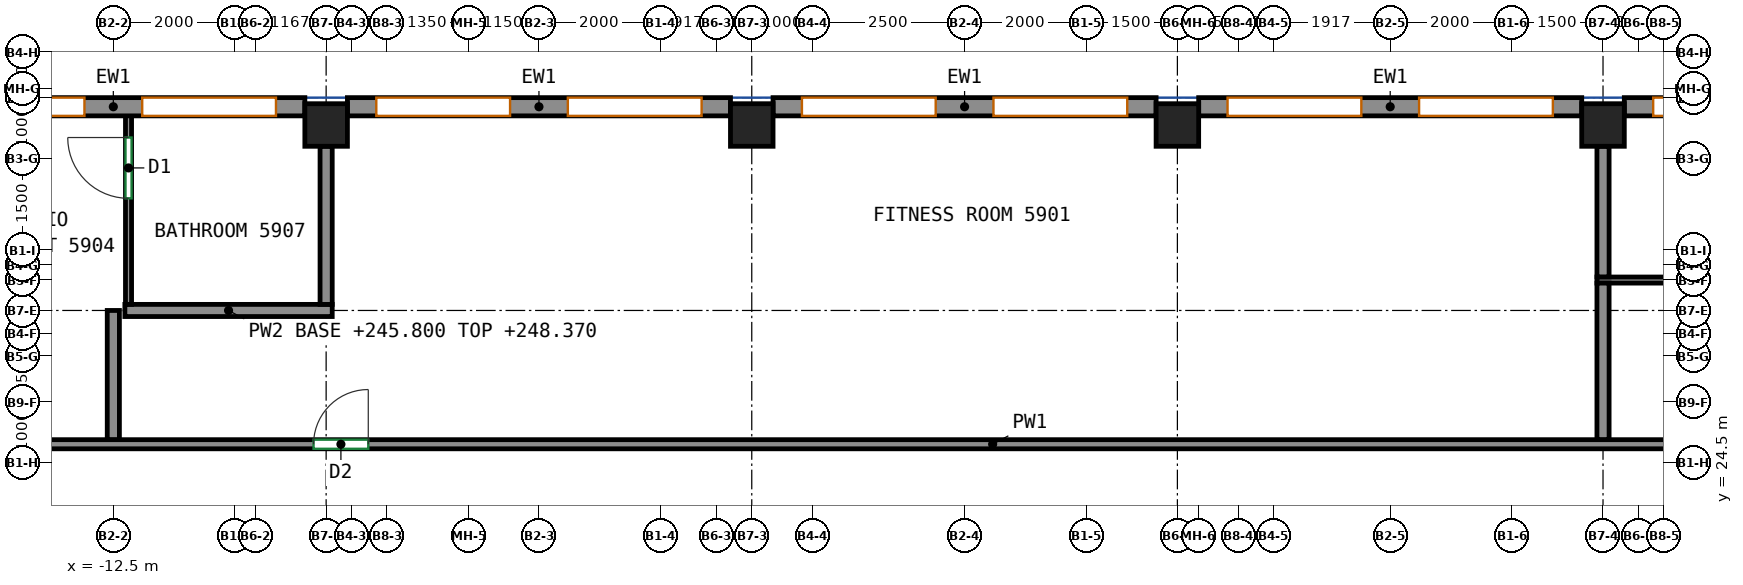
"""IFC4 building model, lengths in metres.
Left out: names, types, materials, properties, quantities, classifications, styles, units other than length and angle.
Written with IfcOpenShell. Run it as: python <this file> out.ifc"""

import sys

from ifc_helpers import new_model, si_unit, direction, frame, frame_2d, origin, origin_2d, place, context, subcontext, project, spatial, rectangle, extrude, source, transform, mapped, element, fill, save


model = new_model("IFC4")
c1 = context("Model", 3, precision=1e-05, world=origin(), true_north=direction((0.0, 1.0)))
c2 = subcontext(c1, "Body", "Model", "MODEL_VIEW")
j1 = project(units=[si_unit("LENGTHUNIT", "METRE"), si_unit("PLANEANGLEUNIT", "RADIAN")], contexts=[c1])
p1 = place(None, origin())
s1 = spatial("IfcSite", under=j1, at=p1, CompositionType="ELEMENT")
p2 = place(p1, origin())
s2 = spatial("IfcBuilding", under=s1, at=p2, CompositionType="ELEMENT")
p3 = place(p2, frame((0.0, 0.0, 245.8)))
s3 = spatial("IfcBuildingStorey", under=s2, at=p3, CompositionType="ELEMENT", Elevation=245.8)
m1 = source(origin(), c2, "Body", "SweptSolid", [
    extrude(rectangle(XDim=0.7, YDim=0.7, at=origin_2d()), origin(), (0.0, 0.0, 1.0), 3.12),
])
for number, where, z_axis, x_axis in (
    (1, (-9.0, 30.05, 0.0), (0.0, 0.0, 1.0), (1.0, 0.0, 0.0)),
    (2, (-2.0, 30.05, 0.0), (0.0, 0.0, 1.0), (1.0, 0.0, 0.0)),
    (3, (5.0, 30.05, 0.0), (0.0, 0.0, 1.0), (1.0, 0.0, 0.0)),
    (4, (12.0, 30.05, 0.0), (0.0, 0.0, 1.0), (1.0, 0.0, 0.0)),
):
    element("IfcColumn", number, at=place(p3, frame(where, z_axis=z_axis, x_axis=x_axis)), inside=s3, PredefinedType="COLUMN", context=c2, shape_type="MappedRepresentation", body=[
        mapped(m1, transform((0.0, 0.0, 0.0))),
    ])
m2 = source(origin(), c2, "Body", "SweptSolid", [
    extrude(rectangle(XDim=6.3, YDim=0.3, at=frame_2d((3.15, 0.0))), origin(), (0.0, 0.0, 1.0), 3.12),
])
p4 = place(p3, frame((18.65, 30.35, 0.0), z_axis=(0.0, 0.0, 1.0), x_axis=(-1.0, 0.0, 0.0)))
e5 = element("IfcWall", 5, at=p4, inside=s3, PredefinedType="SOLIDWALL", context=c2, shape_type="MappedRepresentation", body=[
    mapped(m2, transform((0.0, 0.0, 0.0))),
])
p5 = place(p4, frame((0.475, 0.0, 0.8)))
e6 = element("IfcOpeningElement", 6, at=p5, cuts=e5, PredefinedType="OPENING", context=c2, shape_type="SweptSolid", body=[
    extrude(rectangle(XDim=2.2, YDim=2.05, at=frame_2d((1.1, 1.025))), frame((0.0, 0.16, 0.0), z_axis=(0.0, -1.0, 0.0), x_axis=(1.0, 0.0, 0.0)), (0.0, 0.0, 1.0), 0.32),
])
p6 = place(p4, frame((3.625, 0.0, 0.8)))
e7 = element("IfcOpeningElement", 7, at=p6, cuts=e5, PredefinedType="OPENING", context=c2, shape_type="SweptSolid", body=[
    extrude(rectangle(XDim=2.2, YDim=2.05, at=frame_2d((1.1, 1.025))), frame((0.0, 0.16, 0.0), z_axis=(0.0, -1.0, 0.0), x_axis=(1.0, 0.0, 0.0)), (0.0, 0.0, 1.0), 0.32),
])
p7 = place(p3, frame((11.65, 30.35, 0.0), z_axis=(0.0, 0.0, 1.0), x_axis=(-1.0, 0.0, 0.0)))
e8 = element("IfcWall", 8, at=p7, inside=s3, PredefinedType="SOLIDWALL", context=c2, shape_type="MappedRepresentation", body=[
    mapped(m2, transform((0.0, 0.0, 0.0))),
])
p8 = place(p7, frame((0.475, 0.0, 0.8)))
e9 = element("IfcOpeningElement", 9, at=p8, cuts=e8, PredefinedType="OPENING", context=c2, shape_type="SweptSolid", body=[
    extrude(rectangle(XDim=2.2, YDim=2.05, at=frame_2d((1.1, 1.025))), frame((0.0, 0.16, 0.0), z_axis=(0.0, -1.0, 0.0), x_axis=(1.0, 0.0, 0.0)), (0.0, 0.0, 1.0), 0.32),
])
p9 = place(p7, frame((3.625, 0.0, 0.8)))
e10 = element("IfcOpeningElement", 10, at=p9, cuts=e8, PredefinedType="OPENING", context=c2, shape_type="SweptSolid", body=[
    extrude(rectangle(XDim=2.2, YDim=2.05, at=frame_2d((1.1, 1.025))), frame((0.0, 0.16, 0.0), z_axis=(0.0, -1.0, 0.0), x_axis=(1.0, 0.0, 0.0)), (0.0, 0.0, 1.0), 0.32),
])
p10 = place(p3, frame((4.65, 30.35, 0.0), z_axis=(0.0, 0.0, 1.0), x_axis=(-1.0, 0.0, 0.0)))
e11 = element("IfcWall", 11, at=p10, inside=s3, PredefinedType="SOLIDWALL", context=c2, shape_type="MappedRepresentation", body=[
    mapped(m2, transform((0.0, 0.0, 0.0))),
])
p11 = place(p10, frame((0.475, 0.0, 0.8)))
e12 = element("IfcOpeningElement", 12, at=p11, cuts=e11, PredefinedType="OPENING", context=c2, shape_type="SweptSolid", body=[
    extrude(rectangle(XDim=2.2, YDim=2.05, at=frame_2d((1.1, 1.025))), frame((0.0, 0.16, 0.0), z_axis=(0.0, -1.0, 0.0), x_axis=(1.0, 0.0, 0.0)), (0.0, 0.0, 1.0), 0.32),
])
p12 = place(p10, frame((3.625, 0.0, 0.8)))
e13 = element("IfcOpeningElement", 13, at=p12, cuts=e11, PredefinedType="OPENING", context=c2, shape_type="SweptSolid", body=[
    extrude(rectangle(XDim=2.2, YDim=2.05, at=frame_2d((1.1, 1.025))), frame((0.0, 0.16, 0.0), z_axis=(0.0, -1.0, 0.0), x_axis=(1.0, 0.0, 0.0)), (0.0, 0.0, 1.0), 0.32),
])
p13 = place(p3, frame((-2.35, 30.35, 0.0), z_axis=(0.0, 0.0, 1.0), x_axis=(-1.0, 0.0, 0.0)))
e14 = element("IfcWall", 14, at=p13, inside=s3, PredefinedType="SOLIDWALL", context=c2, shape_type="MappedRepresentation", body=[
    mapped(m2, transform((0.0, 0.0, 0.0))),
])
p14 = place(p13, frame((0.475, 0.0, 0.8)))
e15 = element("IfcOpeningElement", 15, at=p14, cuts=e14, PredefinedType="OPENING", context=c2, shape_type="SweptSolid", body=[
    extrude(rectangle(XDim=2.2, YDim=2.05, at=frame_2d((1.1, 1.025))), frame((0.0, 0.16, 0.0), z_axis=(0.0, -1.0, 0.0), x_axis=(1.0, 0.0, 0.0)), (0.0, 0.0, 1.0), 0.32),
])
p15 = place(p13, frame((3.625, 0.0, 0.8)))
e16 = element("IfcOpeningElement", 16, at=p15, cuts=e14, PredefinedType="OPENING", context=c2, shape_type="SweptSolid", body=[
    extrude(rectangle(XDim=2.2, YDim=2.05, at=frame_2d((1.1, 1.025))), frame((0.0, 0.16, 0.0), z_axis=(0.0, -1.0, 0.0), x_axis=(1.0, 0.0, 0.0)), (0.0, 0.0, 1.0), 0.32),
])
p16 = place(p3, frame((-9.35, 30.35, 0.0), z_axis=(0.0, 0.0, 1.0), x_axis=(-1.0, 0.0, 0.0)))
e17 = element("IfcWall", 17, at=p16, inside=s3, PredefinedType="SOLIDWALL", context=c2, shape_type="MappedRepresentation", body=[
    mapped(m2, transform((0.0, 0.0, 0.0))),
])
p17 = place(p16, frame((0.475, 0.0, 0.8)))
e18 = element("IfcOpeningElement", 18, at=p17, cuts=e17, PredefinedType="OPENING", context=c2, shape_type="SweptSolid", body=[
    extrude(rectangle(XDim=2.2, YDim=2.05, at=frame_2d((1.1, 1.025))), frame((0.0, 0.16, 0.0), z_axis=(0.0, -1.0, 0.0), x_axis=(1.0, 0.0, 0.0)), (0.0, 0.0, 1.0), 0.32),
])
p18 = place(p16, frame((3.625, 0.0, 0.8)))
e19 = element("IfcOpeningElement", 19, at=p18, cuts=e17, PredefinedType="OPENING", context=c2, shape_type="SweptSolid", body=[
    extrude(rectangle(XDim=2.2, YDim=2.05, at=frame_2d((1.1, 1.025))), frame((0.0, 0.16, 0.0), z_axis=(0.0, -1.0, 0.0), x_axis=(1.0, 0.0, 0.0)), (0.0, 0.0, 1.0), 0.32),
])
p19 = place(p3, frame((-16.075, 24.8, 0.0), z_axis=(0.0, 0.0, 1.0), x_axis=(1.0, 0.0, 0.0)))
e20 = element("IfcWall", 20, at=p19, inside=s3, PredefinedType="PARTITIONING", context=c2, shape_type="SweptSolid", body=[
    extrude(rectangle(XDim=36.073, YDim=0.15, at=frame_2d((18.037, 0.0))), origin(), (0.0, 0.0, 1.0), 3.12),
])
p20 = place(p19, frame((6.868, 0.0, 0.0)))
e21 = element("IfcOpeningElement", 21, at=p20, cuts=e20, PredefinedType="OPENING", context=c2, shape_type="SweptSolid", body=[
    extrude(rectangle(XDim=0.9, YDim=2.1, at=frame_2d((0.45, 1.05))), frame((0.0, 0.085, 0.0), z_axis=(0.0, -1.0, 0.0), x_axis=(1.0, 0.0, 0.0)), (0.0, 0.0, 1.0), 0.17),
])
p21 = place(p19, frame((31.009, 0.0, 0.0)))
e22 = element("IfcOpeningElement", 22, at=p21, cuts=e20, PredefinedType="OPENING", context=c2, shape_type="SweptSolid", body=[
    extrude(rectangle(XDim=1.0, YDim=2.1, at=frame_2d((0.5, 1.05))), frame((0.0, 0.085, 0.0), z_axis=(0.0, -1.0, 0.0), x_axis=(1.0, 0.0, 0.0)), (0.0, 0.0, 1.0), 0.17),
])
p22 = place(p3, frame((11.9, 27.5, 0.0), z_axis=(0.0, 0.0, 1.0), x_axis=(1.0, 0.0, 0.0)))
e23 = element("IfcWall", 23, at=p22, inside=s3, PredefinedType="PARTITIONING", context=c2, shape_type="SweptSolid", body=[
    extrude(rectangle(XDim=10.66, YDim=0.1, at=frame_2d((5.33, 0.0))), origin(), (0.0, 0.0, 1.0), 3.12),
])
p23 = place(p22, frame((2.728, 0.0, 0.0)))
e24 = element("IfcOpeningElement", 24, at=p23, cuts=e23, PredefinedType="OPENING", context=c2, shape_type="SweptSolid", body=[
    extrude(rectangle(XDim=1.0, YDim=2.1, at=frame_2d((0.5, 1.05))), frame((0.0, 0.06, 0.0), z_axis=(0.0, -1.0, 0.0), x_axis=(1.0, 0.0, 0.0)), (0.0, 0.0, 1.0), 0.12),
])
p24 = place(p3, frame((12.0, 24.877, 0.0), z_axis=(0.0, 0.0, 1.0), x_axis=(0.0, 1.0, 0.0)))
e25 = element("IfcWall", 25, at=p24, inside=s3, PredefinedType="PARTITIONING", context=c2, shape_type="SweptSolid", body=[
    extrude(rectangle(XDim=2.573, YDim=0.2, at=frame_2d((1.287, 0.0))), origin(), (0.0, 0.0, 1.0), 3.12),
])
p25 = place(p3, frame((12.0, 27.552, 0.0), z_axis=(0.0, 0.0, 1.0), x_axis=(0.0, 1.0, 0.0)))
e26 = element("IfcWall", 26, at=p25, inside=s3, PredefinedType="PARTITIONING", context=c2, shape_type="SweptSolid", body=[
    extrude(rectangle(XDim=2.148, YDim=0.2, at=frame_2d((1.074, 0.0))), origin(), (0.0, 0.0, 1.0), 3.12),
])
p26 = place(p3, frame((-12.5, 27.0, 0.0), z_axis=(0.0, 0.0, 1.0), x_axis=(0.0, -1.0, 0.0)))
e27 = element("IfcWall", 27, at=p26, inside=s3, PredefinedType="PARTITIONING", context=c2, shape_type="SweptSolid", body=[
    extrude(rectangle(XDim=2.123, YDim=0.2, at=frame_2d((1.062, 0.0))), origin(), (0.0, 0.0, 1.0), 3.12),
])
p27 = place(p3, frame((-8.9, 27.0, 0.0), z_axis=(0.0, 0.0, 1.0), x_axis=(-1.0, 0.0, 0.0)))
e28 = element("IfcWall", 28, at=p27, inside=s3, PredefinedType="PARTITIONING", context=c2, shape_type="SweptSolid", body=[
    extrude(rectangle(XDim=3.41, YDim=0.2, at=frame_2d((1.705, 0.0))), origin(), (0.0, 0.0, 1.0), 2.57),
])
p28 = place(p3, frame((-9.0, 27.1, 0.0), z_axis=(0.0, 0.0, 1.0), x_axis=(0.0, 1.0, 0.0)))
e29 = element("IfcWall", 29, at=p28, inside=s3, PredefinedType="PARTITIONING", context=c2, shape_type="SweptSolid", body=[
    extrude(rectangle(XDim=2.6, YDim=0.2, at=frame_2d((1.3, 0.0))), origin(), (0.0, 0.0, 1.0), 3.12),
])
p29 = place(p3, frame((-12.25, 27.1, 0.0), z_axis=(0.0, 0.0, 1.0), x_axis=(0.0, 1.0, 0.0)))
e30 = element("IfcWall", 30, at=p29, inside=s3, PredefinedType="PARTITIONING", context=c2, shape_type="SweptSolid", body=[
    extrude(rectangle(XDim=3.15, YDim=0.1, at=frame_2d((1.575, 0.0))), origin(), (0.0, 0.0, 1.0), 3.12),
])
p30 = place(p29, frame((1.744, 0.0, 0.0)))
e31 = element("IfcOpeningElement", 31, at=p30, cuts=e30, PredefinedType="OPENING", context=c2, shape_type="SweptSolid", body=[
    extrude(rectangle(XDim=1.0, YDim=2.1, at=frame_2d((0.5, 1.05))), frame((0.0, 0.06, 0.0), z_axis=(0.0, -1.0, 0.0), x_axis=(1.0, 0.0, 0.0)), (0.0, 0.0, 1.0), 0.12),
])
p31 = place(p6, origin())
e32 = element("IfcWindow", 32, at=p31, inside=s3, PartitioningType="SINGLE_PANEL", PredefinedType="WINDOW", context=c2, shape_type="SweptSolid", body=[
    extrude(rectangle(XDim=2.2, YDim=2.05, at=frame_2d((1.1, 1.025))), frame((0.0, 0.03, 0.0), z_axis=(0.0, -1.0, 0.0), x_axis=(1.0, 0.0, 0.0)), (0.0, 0.0, 1.0), 0.06),
])
fill(e7, e32)
p32 = place(p8, origin())
e33 = element("IfcWindow", 33, at=p32, inside=s3, PartitioningType="SINGLE_PANEL", PredefinedType="WINDOW", context=c2, shape_type="SweptSolid", body=[
    extrude(rectangle(XDim=2.2, YDim=2.05, at=frame_2d((1.1, 1.025))), frame((0.0, 0.03, 0.0), z_axis=(0.0, -1.0, 0.0), x_axis=(1.0, 0.0, 0.0)), (0.0, 0.0, 1.0), 0.06),
])
fill(e9, e33)
p33 = place(p9, origin())
e34 = element("IfcWindow", 34, at=p33, inside=s3, PartitioningType="SINGLE_PANEL", PredefinedType="WINDOW", context=c2, shape_type="SweptSolid", body=[
    extrude(rectangle(XDim=2.2, YDim=2.05, at=frame_2d((1.1, 1.025))), frame((0.0, 0.03, 0.0), z_axis=(0.0, -1.0, 0.0), x_axis=(1.0, 0.0, 0.0)), (0.0, 0.0, 1.0), 0.06),
])
fill(e10, e34)
p34 = place(p11, origin())
e35 = element("IfcWindow", 35, at=p34, inside=s3, PartitioningType="SINGLE_PANEL", PredefinedType="WINDOW", context=c2, shape_type="SweptSolid", body=[
    extrude(rectangle(XDim=2.2, YDim=2.05, at=frame_2d((1.1, 1.025))), frame((0.0, 0.03, 0.0), z_axis=(0.0, -1.0, 0.0), x_axis=(1.0, 0.0, 0.0)), (0.0, 0.0, 1.0), 0.06),
])
fill(e12, e35)
p35 = place(p12, origin())
e36 = element("IfcWindow", 36, at=p35, inside=s3, PartitioningType="SINGLE_PANEL", PredefinedType="WINDOW", context=c2, shape_type="SweptSolid", body=[
    extrude(rectangle(XDim=2.2, YDim=2.05, at=frame_2d((1.1, 1.025))), frame((0.0, 0.03, 0.0), z_axis=(0.0, -1.0, 0.0), x_axis=(1.0, 0.0, 0.0)), (0.0, 0.0, 1.0), 0.06),
])
fill(e13, e36)
p36 = place(p14, origin())
e37 = element("IfcWindow", 37, at=p36, inside=s3, PartitioningType="SINGLE_PANEL", PredefinedType="WINDOW", context=c2, shape_type="SweptSolid", body=[
    extrude(rectangle(XDim=2.2, YDim=2.05, at=frame_2d((1.1, 1.025))), frame((0.0, 0.03, 0.0), z_axis=(0.0, -1.0, 0.0), x_axis=(1.0, 0.0, 0.0)), (0.0, 0.0, 1.0), 0.06),
])
fill(e15, e37)
p37 = place(p15, origin())
e38 = element("IfcWindow", 38, at=p37, inside=s3, PartitioningType="SINGLE_PANEL", PredefinedType="WINDOW", context=c2, shape_type="SweptSolid", body=[
    extrude(rectangle(XDim=2.2, YDim=2.05, at=frame_2d((1.1, 1.025))), frame((0.0, 0.03, 0.0), z_axis=(0.0, -1.0, 0.0), x_axis=(1.0, 0.0, 0.0)), (0.0, 0.0, 1.0), 0.06),
])
fill(e16, e38)
p38 = place(p17, origin())
e39 = element("IfcWindow", 39, at=p38, inside=s3, PartitioningType="SINGLE_PANEL", PredefinedType="WINDOW", context=c2, shape_type="SweptSolid", body=[
    extrude(rectangle(XDim=2.2, YDim=2.05, at=frame_2d((1.1, 1.025))), frame((0.0, 0.03, 0.0), z_axis=(0.0, -1.0, 0.0), x_axis=(1.0, 0.0, 0.0)), (0.0, 0.0, 1.0), 0.06),
])
fill(e18, e39)
p39 = place(p18, origin())
e40 = element("IfcWindow", 40, at=p39, inside=s3, PartitioningType="SINGLE_PANEL", PredefinedType="WINDOW", context=c2, shape_type="SweptSolid", body=[
    extrude(rectangle(XDim=2.2, YDim=2.05, at=frame_2d((1.1, 1.025))), frame((0.0, 0.03, 0.0), z_axis=(0.0, -1.0, 0.0), x_axis=(1.0, 0.0, 0.0)), (0.0, 0.0, 1.0), 0.06),
])
fill(e19, e40)
p40 = place(p20, origin())
e41 = element("IfcDoor", 41, at=p40, inside=s3, OperationType="SINGLE_SWING_RIGHT", PredefinedType="DOOR", context=c2, shape_type="SweptSolid", body=[
    extrude(rectangle(XDim=0.9, YDim=2.1, at=frame_2d((0.45, 1.05))), frame((0.0, 0.025, 0.0), z_axis=(0.0, -1.0, 0.0), x_axis=(1.0, 0.0, 0.0)), (0.0, 0.0, 1.0), 0.05),
])
fill(e21, e41)
p41 = place(p30, origin())
e42 = element("IfcDoor", 42, at=p41, inside=s3, OperationType="SINGLE_SWING_RIGHT", PredefinedType="DOOR", context=c2, shape_type="SweptSolid", body=[
    extrude(rectangle(XDim=1.0, YDim=2.1, at=frame_2d((0.5, 1.05))), frame((0.0, 0.025, 0.0), z_axis=(0.0, -1.0, 0.0), x_axis=(1.0, 0.0, 0.0)), (0.0, 0.0, 1.0), 0.05),
])
fill(e31, e42)
save(model, sys.argv[1])
